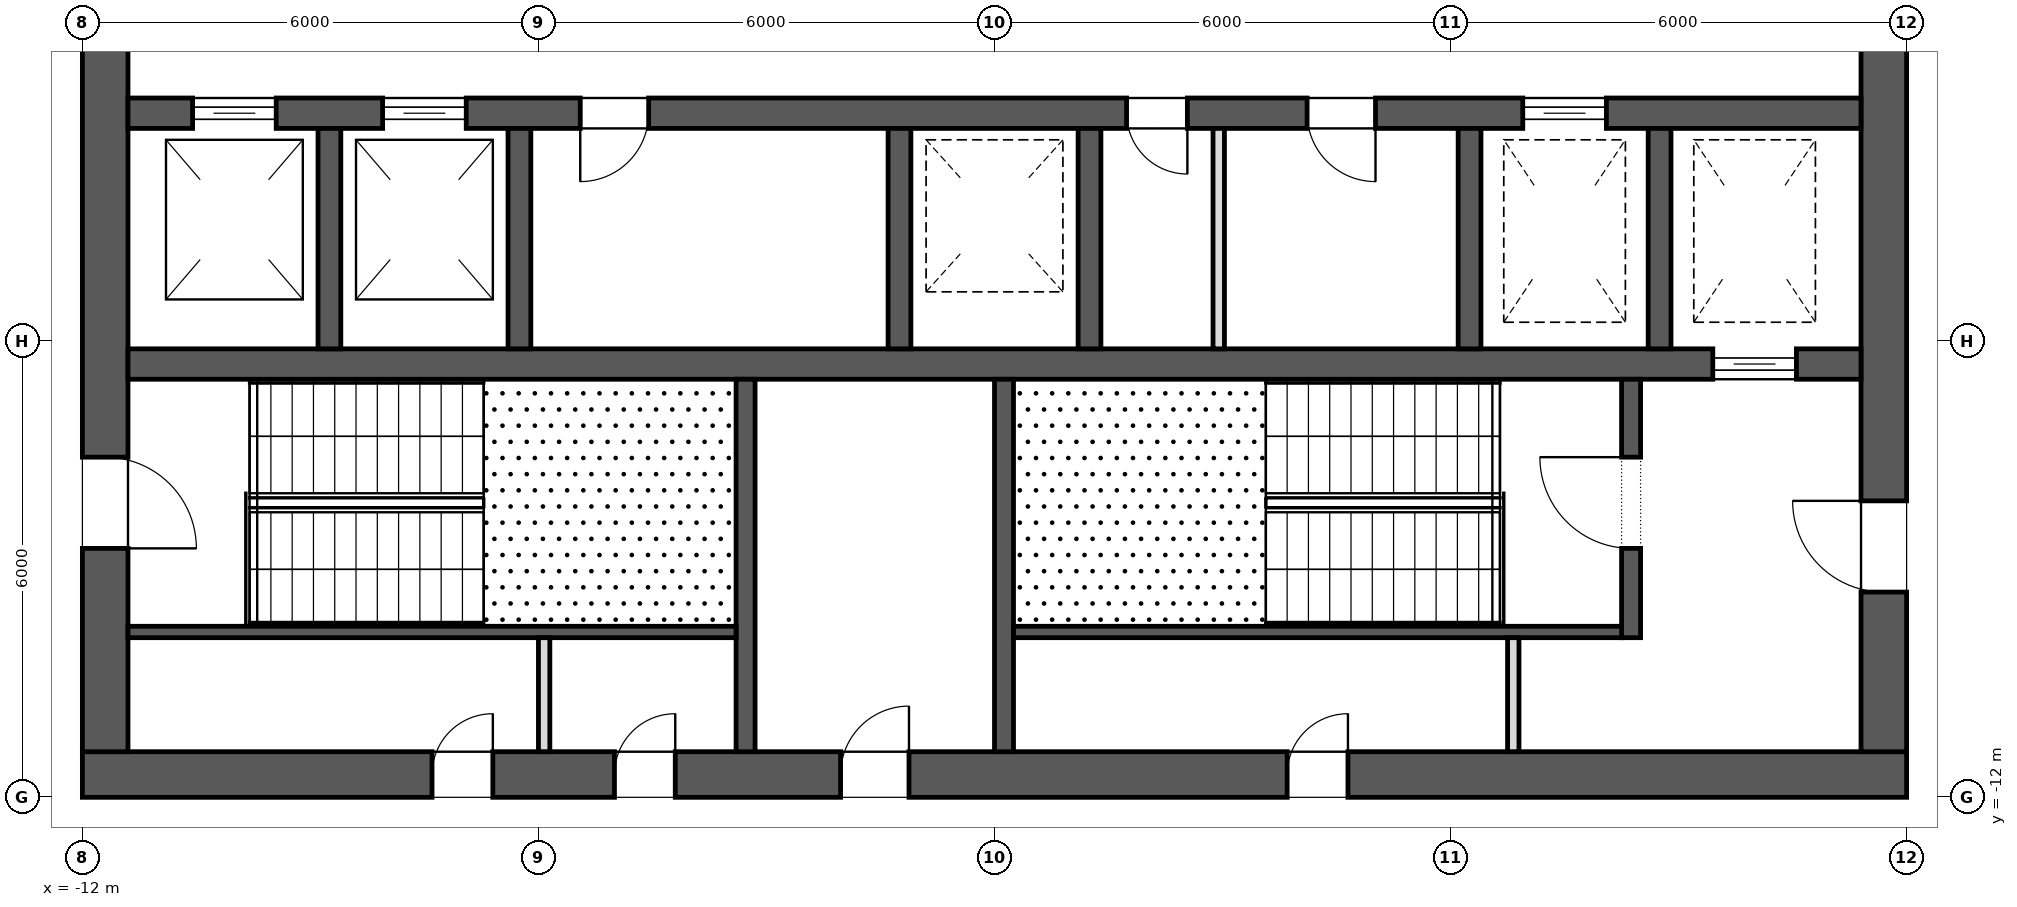
"""IFC4 building model, lengths in metres.
Left out: names, types, materials, properties, quantities, classifications, styles, units other than length and angle.
Written with IfcOpenShell. Run it as: python <this file> out.ifc"""

import sys

from ifc_helpers import new_model, si_unit, direction, frame, frame_2d, origin, place, context, subcontext, project, spatial, rectangle, extrude, element, fill, save


model = new_model("IFC4")
c1 = context("Model", 3, precision=1e-05, world=origin(), true_north=direction((0.0, 1.0)))
c2 = subcontext(c1, "Body", "Model", "MODEL_VIEW")
j1 = project(units=[si_unit("LENGTHUNIT", "METRE"), si_unit("PLANEANGLEUNIT", "RADIAN")], contexts=[c1])
p1 = place(None, origin())
s1 = spatial("IfcSite", under=j1, at=p1, CompositionType="ELEMENT")
p2 = place(p1, origin())
s2 = spatial("IfcBuilding", under=s1, at=p2, CompositionType="ELEMENT")
p3 = place(p2, frame((0.0, 0.0, 316.3)))
s3 = spatial("IfcBuildingStorey", under=s2, at=p3, CompositionType="ELEMENT", Elevation=316.3)
p4 = place(p3, frame((-12.0, -11.7, 0.0), z_axis=(0.0, 0.0, 1.0), x_axis=(1.0, 0.0, 0.0)))
e1 = element("IfcWall", 1, at=p4, inside=s3, PredefinedType="SHEAR", context=c2, shape_type="SweptSolid", body=[
    extrude(rectangle(XDim=24.0, YDim=0.6, at=frame_2d((12.0, 0.0))), origin(), (0.0, 0.0, 1.0), 4.0),
])
p5 = place(p4, frame((9.975, 0.0, 0.0)))
e2 = element("IfcOpeningElement", 2, at=p5, cuts=e1, PredefinedType="OPENING", context=c2, shape_type="SweptSolid", body=[
    extrude(rectangle(XDim=0.9, YDim=2.1, at=frame_2d((0.45, 1.05))), frame((0.0, 0.312, 0.0), z_axis=(0.0, -1.0, 0.0), x_axis=(1.0, 0.0, 0.0)), (0.0, 0.0, 1.0), 0.624),
])
p6 = place(p4, frame((4.6, 0.0, 0.0)))
e3 = element("IfcOpeningElement", 3, at=p6, cuts=e1, PredefinedType="OPENING", context=c2, shape_type="SweptSolid", body=[
    extrude(rectangle(XDim=0.8, YDim=2.1, at=frame_2d((0.4, 1.05))), frame((0.0, 0.312, 0.0), z_axis=(0.0, -1.0, 0.0), x_axis=(1.0, 0.0, 0.0)), (0.0, 0.0, 1.0), 0.624),
])
p7 = place(p4, frame((7.0, 0.0, 0.0)))
e4 = element("IfcOpeningElement", 4, at=p7, cuts=e1, PredefinedType="OPENING", context=c2, shape_type="SweptSolid", body=[
    extrude(rectangle(XDim=0.8, YDim=2.1, at=frame_2d((0.4, 1.05))), frame((0.0, 0.312, 0.0), z_axis=(0.0, -1.0, 0.0), x_axis=(1.0, 0.0, 0.0)), (0.0, 0.0, 1.0), 0.624),
])
p8 = place(p4, frame((15.85, 0.0, 0.0)))
e5 = element("IfcOpeningElement", 5, at=p8, cuts=e1, PredefinedType="OPENING", context=c2, shape_type="SweptSolid", body=[
    extrude(rectangle(XDim=0.8, YDim=2.1, at=frame_2d((0.4, 1.05))), frame((0.0, 0.312, 0.0), z_axis=(0.0, -1.0, 0.0), x_axis=(1.0, 0.0, 0.0)), (0.0, 0.0, 1.0), 0.624),
])
p9 = place(p3, frame((11.7, -11.4, 0.0), z_axis=(0.0, 0.0, 1.0), x_axis=(0.0, 1.0, 0.0)))
e6 = element("IfcWall", 6, at=p9, inside=s3, PredefinedType="SHEAR", context=c2, shape_type="SweptSolid", body=[
    extrude(rectangle(XDim=22.8, YDim=0.6, at=frame_2d((11.4, 0.0))), origin(), (0.0, 0.0, 1.0), 4.0),
])
p10 = place(p9, frame((10.2, 0.0, 0.0)))
e7 = element("IfcOpeningElement", 7, at=p10, cuts=e6, PredefinedType="OPENING", context=c2, shape_type="SweptSolid", body=[
    extrude(rectangle(XDim=2.4, YDim=2.1, at=frame_2d((1.2, 1.05))), frame((0.0, 0.312, 0.0), z_axis=(0.0, -1.0, 0.0), x_axis=(1.0, 0.0, 0.0)), (0.0, 0.0, 1.0), 0.624),
])
p11 = place(p9, frame((19.5, 0.0, 0.0)))
e8 = element("IfcOpeningElement", 8, at=p11, cuts=e6, PredefinedType="OPENING", context=c2, shape_type="SweptSolid", body=[
    extrude(rectangle(XDim=1.2, YDim=2.1, at=frame_2d((0.6, 1.05))), frame((0.0, 0.312, 0.0), z_axis=(0.0, -1.0, 0.0), x_axis=(1.0, 0.0, 0.0)), (0.0, 0.0, 1.0), 0.624),
])
p12 = place(p9, frame((2.1, 0.0, 0.0)))
e9 = element("IfcOpeningElement", 9, at=p12, cuts=e6, PredefinedType="OPENING", context=c2, shape_type="SweptSolid", body=[
    extrude(rectangle(XDim=1.2, YDim=2.1, at=frame_2d((0.6, 1.05))), frame((0.0, 0.312, 0.0), z_axis=(0.0, -1.0, 0.0), x_axis=(1.0, 0.0, 0.0)), (0.0, 0.0, 1.0), 0.624),
])
p13 = place(p3, frame((-11.7, -11.4, 0.0), z_axis=(0.0, 0.0, 1.0), x_axis=(0.0, 1.0, 0.0)))
e10 = element("IfcWall", 10, at=p13, inside=s3, PredefinedType="SHEAR", context=c2, shape_type="SweptSolid", body=[
    extrude(rectangle(XDim=22.8, YDim=0.6, at=frame_2d((11.4, 0.0))), origin(), (0.0, 0.0, 1.0), 4.0),
])
p14 = place(p13, frame((10.2, 0.0, 0.0)))
e11 = element("IfcOpeningElement", 11, at=p14, cuts=e10, PredefinedType="OPENING", context=c2, shape_type="SweptSolid", body=[
    extrude(rectangle(XDim=2.4, YDim=2.1, at=frame_2d((1.2, 1.05))), frame((0.0, 0.312, 0.0), z_axis=(0.0, -1.0, 0.0), x_axis=(1.0, 0.0, 0.0)), (0.0, 0.0, 1.0), 0.624),
])
p15 = place(p13, frame((18.925, 0.0, 0.0)))
e12 = element("IfcOpeningElement", 12, at=p15, cuts=e10, PredefinedType="OPENING", context=c2, shape_type="SweptSolid", body=[
    extrude(rectangle(XDim=1.2, YDim=2.1, at=frame_2d((0.6, 1.05))), frame((0.0, 0.312, 0.0), z_axis=(0.0, -1.0, 0.0), x_axis=(1.0, 0.0, 0.0)), (0.0, 0.0, 1.0), 0.624),
])
p16 = place(p13, frame((2.675, 0.0, 0.0)))
e13 = element("IfcOpeningElement", 13, at=p16, cuts=e10, PredefinedType="OPENING", context=c2, shape_type="SweptSolid", body=[
    extrude(rectangle(XDim=1.2, YDim=2.1, at=frame_2d((0.6, 1.05))), frame((0.0, 0.312, 0.0), z_axis=(0.0, -1.0, 0.0), x_axis=(1.0, 0.0, 0.0)), (0.0, 0.0, 1.0), 0.624),
])
p17 = place(p3, frame((-11.4, -3.0, 0.0), z_axis=(0.0, 0.0, 1.0), x_axis=(1.0, 0.0, 0.0)))
e14 = element("IfcWall", 14, at=p17, inside=s3, PredefinedType="SHEAR", context=c2, shape_type="SweptSolid", body=[
    extrude(rectangle(XDim=22.8, YDim=0.4, at=frame_2d((11.4, 0.0))), origin(), (0.0, 0.0, 1.0), 4.0),
])
p18 = place(p17, frame((0.85, 0.0, 0.0)))
e15 = element("IfcOpeningElement", 15, at=p18, cuts=e14, PredefinedType="OPENING", context=c2, shape_type="SweptSolid", body=[
    extrude(rectangle(XDim=1.1, YDim=2.1, at=frame_2d((0.55, 1.05))), frame((0.0, 0.212, 0.0), z_axis=(0.0, -1.0, 0.0), x_axis=(1.0, 0.0, 0.0)), (0.0, 0.0, 1.0), 0.424),
])
p19 = place(p17, frame((3.35, 0.0, 0.0)))
e16 = element("IfcOpeningElement", 16, at=p19, cuts=e14, PredefinedType="OPENING", context=c2, shape_type="SweptSolid", body=[
    extrude(rectangle(XDim=1.1, YDim=2.1, at=frame_2d((0.55, 1.05))), frame((0.0, 0.212, 0.0), z_axis=(0.0, -1.0, 0.0), x_axis=(1.0, 0.0, 0.0)), (0.0, 0.0, 1.0), 0.424),
])
p20 = place(p17, frame((18.35, 0.0, 0.0)))
e17 = element("IfcOpeningElement", 17, at=p20, cuts=e14, PredefinedType="OPENING", context=c2, shape_type="SweptSolid", body=[
    extrude(rectangle(XDim=1.1, YDim=2.1, at=frame_2d((0.55, 1.05))), frame((0.0, 0.212, 0.0), z_axis=(0.0, -1.0, 0.0), x_axis=(1.0, 0.0, 0.0)), (0.0, 0.0, 1.0), 0.424),
])
p21 = place(p17, frame((13.137, 0.0, 0.0)))
e18 = element("IfcOpeningElement", 18, at=p21, cuts=e14, PredefinedType="OPENING", context=c2, shape_type="SweptSolid", body=[
    extrude(rectangle(XDim=0.8, YDim=2.1, at=frame_2d((0.4, 1.05))), frame((0.0, 0.212, 0.0), z_axis=(0.0, -1.0, 0.0), x_axis=(1.0, 0.0, 0.0)), (0.0, 0.0, 1.0), 0.424),
])
p22 = place(p17, frame((15.512, 0.0, 0.0)))
e19 = element("IfcOpeningElement", 19, at=p22, cuts=e14, PredefinedType="OPENING", context=c2, shape_type="SweptSolid", body=[
    extrude(rectangle(XDim=0.9, YDim=2.1, at=frame_2d((0.45, 1.05))), frame((0.0, 0.212, 0.0), z_axis=(0.0, -1.0, 0.0), x_axis=(1.0, 0.0, 0.0)), (0.0, 0.0, 1.0), 0.424),
])
p23 = place(p17, frame((5.95, 0.0, 0.0)))
e20 = element("IfcOpeningElement", 20, at=p23, cuts=e14, PredefinedType="OPENING", context=c2, shape_type="SweptSolid", body=[
    extrude(rectangle(XDim=0.9, YDim=2.1, at=frame_2d((0.45, 1.05))), frame((0.0, 0.212, 0.0), z_axis=(0.0, -1.0, 0.0), x_axis=(1.0, 0.0, 0.0)), (0.0, 0.0, 1.0), 0.424),
])
p24 = place(p3, frame((-11.4, -6.3, 0.0), z_axis=(0.0, 0.0, 1.0), x_axis=(1.0, 0.0, 0.0)))
e21 = element("IfcWall", 21, at=p24, inside=s3, PredefinedType="SHEAR", context=c2, shape_type="SweptSolid", body=[
    extrude(rectangle(XDim=22.8, YDim=0.4, at=frame_2d((11.4, 0.0))), origin(), (0.0, 0.0, 1.0), 4.0),
])
p25 = place(p24, frame((20.85, 0.0, 0.0)))
e22 = element("IfcOpeningElement", 22, at=p25, cuts=e21, PredefinedType="OPENING", context=c2, shape_type="SweptSolid", body=[
    extrude(rectangle(XDim=1.1, YDim=2.1, at=frame_2d((0.55, 1.05))), frame((0.0, 0.212, 0.0), z_axis=(0.0, -1.0, 0.0), x_axis=(1.0, 0.0, 0.0)), (0.0, 0.0, 1.0), 0.424),
])
for number, where, z_axis, x_axis in (
    (23, (-8.75, -6.1, 0.0), (0.0, 0.0, 1.0), (0.0, 1.0, 0.0)),
    (24, (-6.25, -6.1, 0.0), (0.0, 0.0, 1.0), (0.0, 1.0, 0.0)),
    (25, (-1.25, -6.1, 0.0), (0.0, 0.0, 1.0), (0.0, 1.0, 0.0)),
    (26, (1.25, -6.1, 0.0), (0.0, 0.0, 1.0), (0.0, 1.0, 0.0)),
    (27, (6.25, -6.1, 0.0), (0.0, 0.0, 1.0), (0.0, 1.0, 0.0)),
    (28, (8.75, -6.1, 0.0), (0.0, 0.0, 1.0), (0.0, 1.0, 0.0)),
):
    element("IfcWall", number, at=place(p3, frame(where, z_axis=z_axis, x_axis=x_axis)), inside=s3, PredefinedType="SHEAR", context=c2, shape_type="SweptSolid", body=[
        extrude(rectangle(XDim=2.9, YDim=0.3, at=frame_2d((1.45, 0.0))), origin(), (0.0, 0.0, 1.0), 4.0),
    ])
for number, where, z_axis, x_axis in (
    (29, (-3.275, -11.4, 0.0), (0.0, 0.0, 1.0), (0.0, 1.0, 0.0)),
    (30, (0.125, -11.4, 0.0), (0.0, 0.0, 1.0), (0.0, 1.0, 0.0)),
):
    element("IfcWall", number, at=place(p3, frame(where, z_axis=z_axis, x_axis=x_axis)), inside=s3, PredefinedType="SHEAR", context=c2, shape_type="SweptSolid", body=[
        extrude(rectangle(XDim=4.9, YDim=0.25, at=frame_2d((2.45, 0.0))), origin(), (0.0, 0.0, 1.0), 3.7),
    ])
p26 = place(p3, frame((8.375, -9.9, 0.0), z_axis=(0.0, 0.0, 1.0), x_axis=(0.0, 1.0, 0.0)))
e31 = element("IfcWall", 31, at=p26, inside=s3, PredefinedType="SHEAR", context=c2, shape_type="SweptSolid", body=[
    extrude(rectangle(XDim=3.4, YDim=0.25, at=frame_2d((1.7, 0.0))), origin(), (0.0, 0.0, 1.0), 3.7),
])
p27 = place(p26, frame((1.175, 0.0, 0.0)))
e32 = element("IfcOpeningElement", 32, at=p27, cuts=e31, PredefinedType="OPENING", context=c2, shape_type="SweptSolid", body=[
    extrude(rectangle(XDim=1.2, YDim=2.1, at=frame_2d((0.6, 1.05))), frame((0.0, 0.137, 0.0), z_axis=(0.0, -1.0, 0.0), x_axis=(1.0, 0.0, 0.0)), (0.0, 0.0, 1.0), 0.274),
])
for number, where, z_axis, x_axis in (
    (33, (-11.4, -9.825, 0.0), (0.0, 0.0, 1.0), (1.0, 0.0, 0.0)),
    (34, (0.25, -9.825, 0.0), (0.0, 0.0, 1.0), (1.0, 0.0, 0.0)),
):
    element("IfcWall", number, at=place(p3, frame(where, z_axis=z_axis, x_axis=x_axis)), inside=s3, PredefinedType="SHEAR", context=c2, shape_type="SweptSolid", body=[
        extrude(rectangle(XDim=8.0, YDim=0.15, at=frame_2d((4.0, 0.0))), origin(), (0.0, 0.0, 1.0), 3.7),
    ])
for number, where, z_axis, x_axis in (
    (35, (-5.925, -11.4, 0.0), (0.0, 0.0, 1.0), (0.0, 1.0, 0.0)),
    (36, (6.825, -11.4, 0.0), (0.0, 0.0, 1.0), (0.0, 1.0, 0.0)),
):
    element("IfcWall", number, at=place(p3, frame(where, z_axis=z_axis, x_axis=x_axis)), inside=s3, PredefinedType="PARTITIONING", context=c2, shape_type="SweptSolid", body=[
        extrude(rectangle(XDim=1.5, YDim=0.15, at=frame_2d((0.75, 0.0))), origin(), (0.0, 0.0, 1.0), 3.7),
    ])
p28 = place(p3, frame((2.95, -6.1, 0.0), z_axis=(0.0, 0.0, 1.0), x_axis=(0.0, 1.0, 0.0)))
e37 = element("IfcWall", 37, at=p28, inside=s3, PredefinedType="PARTITIONING", context=c2, shape_type="SweptSolid", body=[
    extrude(rectangle(XDim=2.9, YDim=0.15, at=frame_2d((1.45, 0.0))), origin(), (0.0, 0.0, 1.0), 3.7),
])
p29 = place(p25, origin())
e38 = element("IfcDoor", 38, at=p29, inside=s3, OperationType="SLIDING_TO_LEFT", PredefinedType="DOOR", context=c2, shape_type="SweptSolid", body=[
    extrude(rectangle(XDim=1.1, YDim=2.1, at=frame_2d((0.55, 1.05))), frame((0.0, 0.025, 0.0), z_axis=(0.0, -1.0, 0.0), x_axis=(1.0, 0.0, 0.0)), (0.0, 0.0, 1.0), 0.05),
])
fill(e22, e38)
p30 = place(p18, origin())
e39 = element("IfcDoor", 39, at=p30, inside=s3, OperationType="SLIDING_TO_LEFT", PredefinedType="DOOR", context=c2, shape_type="SweptSolid", body=[
    extrude(rectangle(XDim=1.1, YDim=2.1, at=frame_2d((0.55, 1.05))), frame((0.0, 0.025, 0.0), z_axis=(0.0, -1.0, 0.0), x_axis=(1.0, 0.0, 0.0)), (0.0, 0.0, 1.0), 0.05),
])
fill(e15, e39)
p31 = place(p19, origin())
e40 = element("IfcDoor", 40, at=p31, inside=s3, OperationType="SLIDING_TO_LEFT", PredefinedType="DOOR", context=c2, shape_type="SweptSolid", body=[
    extrude(rectangle(XDim=1.1, YDim=2.1, at=frame_2d((0.55, 1.05))), frame((0.0, 0.025, 0.0), z_axis=(0.0, -1.0, 0.0), x_axis=(1.0, 0.0, 0.0)), (0.0, 0.0, 1.0), 0.05),
])
fill(e16, e40)
p32 = place(p20, origin())
e41 = element("IfcDoor", 41, at=p32, inside=s3, OperationType="SLIDING_TO_LEFT", PredefinedType="DOOR", context=c2, shape_type="SweptSolid", body=[
    extrude(rectangle(XDim=1.1, YDim=2.1, at=frame_2d((0.55, 1.05))), frame((0.0, 0.025, 0.0), z_axis=(0.0, -1.0, 0.0), x_axis=(1.0, 0.0, 0.0)), (0.0, 0.0, 1.0), 0.05),
])
fill(e17, e41)
p33 = place(p16, frame((1.2, 0.0, 0.0), z_axis=(0.0, 0.0, 1.0), x_axis=(-1.0, 0.0, 0.0)))
e42 = element("IfcDoor", 42, at=p33, inside=s3, OperationType="SINGLE_SWING_LEFT", PredefinedType="DOOR", context=c2, shape_type="SweptSolid", body=[
    extrude(rectangle(XDim=1.2, YDim=2.1, at=frame_2d((0.6, 1.05))), frame((0.0, 0.025, 0.0), z_axis=(0.0, -1.0, 0.0), x_axis=(1.0, 0.0, 0.0)), (0.0, 0.0, 1.0), 0.05),
])
fill(e13, e42)
p34 = place(p27, origin())
e43 = element("IfcDoor", 43, at=p34, inside=s3, OperationType="SINGLE_SWING_LEFT", PredefinedType="DOOR", context=c2, shape_type="SweptSolid", body=[
    extrude(rectangle(XDim=1.2, YDim=2.1, at=frame_2d((0.6, 1.05))), frame((0.0, 0.025, 0.0), z_axis=(0.0, -1.0, 0.0), x_axis=(1.0, 0.0, 0.0)), (0.0, 0.0, 1.0), 0.05),
])
fill(e32, e43)
p35 = place(p12, origin())
e44 = element("IfcDoor", 44, at=p35, inside=s3, OperationType="SINGLE_SWING_LEFT", PredefinedType="DOOR", context=c2, shape_type="SweptSolid", body=[
    extrude(rectangle(XDim=1.2, YDim=2.1, at=frame_2d((0.6, 1.05))), frame((0.0, 0.025, 0.0), z_axis=(0.0, -1.0, 0.0), x_axis=(1.0, 0.0, 0.0)), (0.0, 0.0, 1.0), 0.05),
])
fill(e9, e44)
p36 = place(p5, origin())
e45 = element("IfcDoor", 45, at=p36, inside=s3, OperationType="SINGLE_SWING_LEFT", PredefinedType="DOOR", context=c2, shape_type="SweptSolid", body=[
    extrude(rectangle(XDim=0.9, YDim=2.1, at=frame_2d((0.45, 1.05))), frame((0.0, 0.025, 0.0), z_axis=(0.0, -1.0, 0.0), x_axis=(1.0, 0.0, 0.0)), (0.0, 0.0, 1.0), 0.05),
])
fill(e2, e45)
p37 = place(p6, origin())
e46 = element("IfcDoor", 46, at=p37, inside=s3, OperationType="SINGLE_SWING_LEFT", PredefinedType="DOOR", context=c2, shape_type="SweptSolid", body=[
    extrude(rectangle(XDim=0.8, YDim=2.1, at=frame_2d((0.4, 1.05))), frame((0.0, 0.025, 0.0), z_axis=(0.0, -1.0, 0.0), x_axis=(1.0, 0.0, 0.0)), (0.0, 0.0, 1.0), 0.05),
])
fill(e3, e46)
p38 = place(p7, origin())
e47 = element("IfcDoor", 47, at=p38, inside=s3, OperationType="SINGLE_SWING_LEFT", PredefinedType="DOOR", context=c2, shape_type="SweptSolid", body=[
    extrude(rectangle(XDim=0.8, YDim=2.1, at=frame_2d((0.4, 1.05))), frame((0.0, 0.025, 0.0), z_axis=(0.0, -1.0, 0.0), x_axis=(1.0, 0.0, 0.0)), (0.0, 0.0, 1.0), 0.05),
])
fill(e4, e47)
p39 = place(p8, origin())
e48 = element("IfcDoor", 48, at=p39, inside=s3, OperationType="SINGLE_SWING_LEFT", PredefinedType="DOOR", context=c2, shape_type="SweptSolid", body=[
    extrude(rectangle(XDim=0.8, YDim=2.1, at=frame_2d((0.4, 1.05))), frame((0.0, 0.025, 0.0), z_axis=(0.0, -1.0, 0.0), x_axis=(1.0, 0.0, 0.0)), (0.0, 0.0, 1.0), 0.05),
])
fill(e5, e48)
p40 = place(p21, frame((0.8, 0.0, 0.0), z_axis=(0.0, 0.0, 1.0), x_axis=(-1.0, 0.0, 0.0)))
e49 = element("IfcDoor", 49, at=p40, inside=s3, OperationType="SINGLE_SWING_RIGHT", PredefinedType="DOOR", context=c2, shape_type="SweptSolid", body=[
    extrude(rectangle(XDim=0.8, YDim=2.1, at=frame_2d((0.4, 1.05))), frame((0.0, 0.025, 0.0), z_axis=(0.0, -1.0, 0.0), x_axis=(1.0, 0.0, 0.0)), (0.0, 0.0, 1.0), 0.05),
])
fill(e18, e49)
p41 = place(p22, frame((0.9, 0.0, 0.0), z_axis=(0.0, 0.0, 1.0), x_axis=(-1.0, 0.0, 0.0)))
e50 = element("IfcDoor", 50, at=p41, inside=s3, OperationType="SINGLE_SWING_RIGHT", PredefinedType="DOOR", context=c2, shape_type="SweptSolid", body=[
    extrude(rectangle(XDim=0.9, YDim=2.1, at=frame_2d((0.45, 1.05))), frame((0.0, 0.025, 0.0), z_axis=(0.0, -1.0, 0.0), x_axis=(1.0, 0.0, 0.0)), (0.0, 0.0, 1.0), 0.05),
])
fill(e19, e50)
p42 = place(p23, frame((0.9, 0.0, 0.0), z_axis=(0.0, 0.0, 1.0), x_axis=(-1.0, 0.0, 0.0)))
e51 = element("IfcDoor", 51, at=p42, inside=s3, OperationType="SINGLE_SWING_LEFT", PredefinedType="DOOR", context=c2, shape_type="SweptSolid", body=[
    extrude(rectangle(XDim=0.9, YDim=2.1, at=frame_2d((0.45, 1.05))), frame((0.0, 0.025, 0.0), z_axis=(0.0, -1.0, 0.0), x_axis=(1.0, 0.0, 0.0)), (0.0, 0.0, 1.0), 0.05),
])
fill(e20, e51)
save(model, sys.argv[1])
